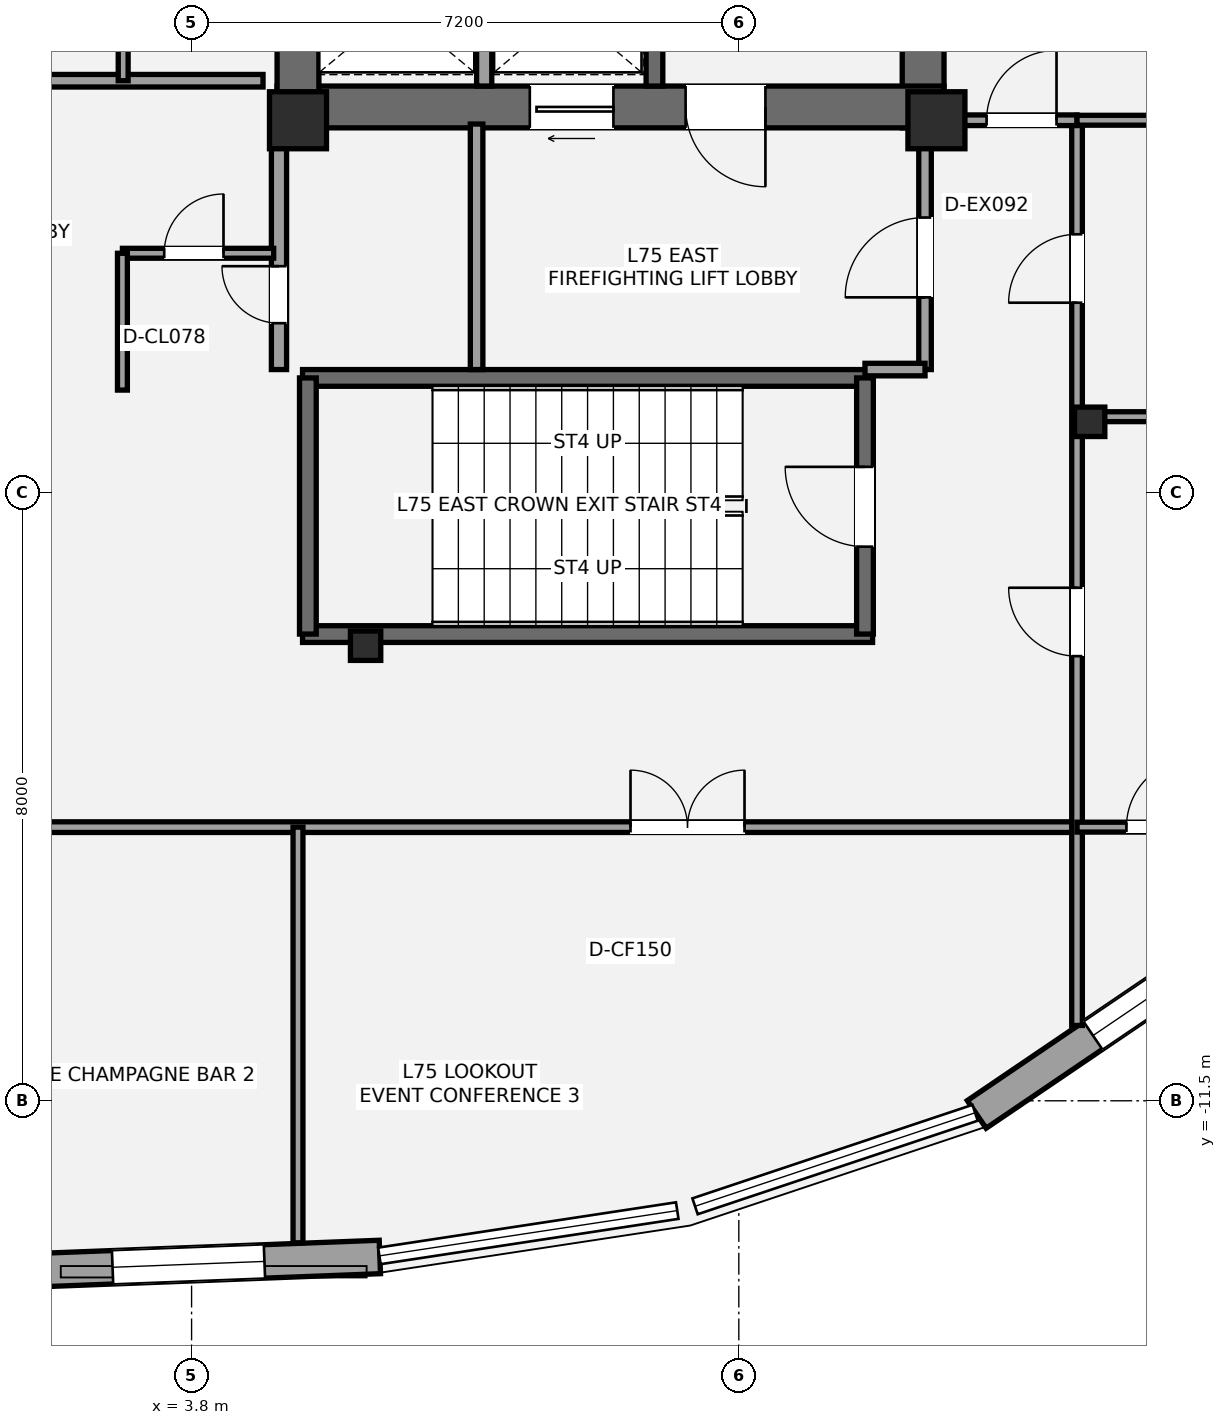
"""IFC4 building model, lengths in metres.
Left out: names, types, materials, properties, quantities, classifications, styles, units other than length and angle.
Written with IfcOpenShell. Run it as: python <this file> out.ifc"""

import sys

from ifc_helpers import new_model, si_unit, direction, frame, frame_2d, origin, origin_2d, place, context, subcontext, project, spatial, rectangle, i_section, extrude, element, fill, save


model = new_model("IFC4")
c1 = context("Model", 3, precision=1e-05, world=origin(), true_north=direction((0.0, 1.0)))
c2 = subcontext(c1, "Body", "Model", "MODEL_VIEW")
j1 = project(units=[si_unit("LENGTHUNIT", "METRE"), si_unit("PLANEANGLEUNIT", "RADIAN")], contexts=[c1])
p1 = place(None, origin())
s1 = spatial("IfcSite", under=j1, at=p1, CompositionType="ELEMENT")
p2 = place(p1, origin())
s2 = spatial("IfcBuilding", under=s1, at=p2, CompositionType="ELEMENT")
p3 = place(p2, frame((0.0, 0.0, 264.8)))
s3 = spatial("IfcBuildingStorey", under=s2, at=p3, CompositionType="ELEMENT", Elevation=264.8)
p4 = place(p3, frame((13.425, 1.3, 0.0), z_axis=(0.0, 0.0, 1.0), x_axis=(0.0, 1.0, 0.0)))
e1 = element("IfcWall", 1, at=p4, inside=s3, PredefinedType="SHEAR", context=c2, shape_type="SweptSolid", body=[
    extrude(rectangle(XDim=8.25, YDim=0.55, at=frame_2d((4.125, 0.0))), origin(), (0.0, 0.0, 1.0), 4.4),
])
p5 = place(p3, frame((13.7, 1.575, 0.0), z_axis=(0.0, 0.0, 1.0), x_axis=(-1.0, 0.0, 0.0)))
e2 = element("IfcWall", 2, at=p5, inside=s3, PredefinedType="SHEAR", context=c2, shape_type="SweptSolid", body=[
    extrude(rectangle(XDim=8.775, YDim=0.55, at=frame_2d((4.387, 0.0))), origin(), (0.0, 0.0, 1.0), 4.4),
])
p6 = place(p5, frame((2.35, 0.0, 0.0)))
e3 = element("IfcOpeningElement", 3, at=p6, cuts=e2, PredefinedType="OPENING", context=c2, shape_type="SweptSolid", body=[
    extrude(rectangle(XDim=1.05, YDim=2.15, at=frame_2d((0.525, 1.075))), frame((0.0, 0.285, 0.0), z_axis=(0.0, -1.0, 0.0), x_axis=(1.0, 0.0, 0.0)), (0.0, 0.0, 1.0), 0.57),
])
p7 = place(p5, frame((4.35, 0.0, 0.0)))
e4 = element("IfcOpeningElement", 4, at=p7, cuts=e2, PredefinedType="OPENING", context=c2, shape_type="SweptSolid", body=[
    extrude(rectangle(XDim=1.1, YDim=2.2, at=frame_2d((0.55, 1.1))), frame((0.0, 0.285, 0.0), z_axis=(0.0, -1.0, 0.0), x_axis=(1.0, 0.0, 0.0)), (0.0, 0.0, 1.0), 0.57),
])
p8 = place(p3, frame((5.2, 1.3, 0.0), z_axis=(0.0, 0.0, 1.0), x_axis=(0.0, 1.0, 0.0)))
e5 = element("IfcWall", 5, at=p8, inside=s3, PredefinedType="SHEAR", context=c2, shape_type="SweptSolid", body=[
    extrude(rectangle(XDim=2.5, YDim=0.55, at=frame_2d((1.25, 0.0))), origin(), (0.0, 0.0, 1.0), 4.4),
])
p9 = place(p3, frame((9.89, 1.85, 0.0), z_axis=(0.0, 0.0, 1.0), x_axis=(0.0, 1.0, 0.0)))
e6 = element("IfcWall", 6, at=p9, inside=s3, PredefinedType="SHEAR", context=c2, shape_type="SweptSolid", body=[
    extrude(rectangle(XDim=7.15, YDim=0.22, at=frame_2d((3.575, 0.0))), origin(), (0.0, 0.0, 1.0), 4.4),
])
for number, where, z_axis, x_axis in (
    (7, (5.26, -1.99, 0.0), (0.0, 0.0, 1.0), (1.0, 0.0, 0.0)),
    (8, (5.26, -5.36, 0.0), (0.0, 0.0, 1.0), (1.0, 0.0, 0.0)),
):
    element("IfcWall", number, at=place(p3, frame(where, z_axis=z_axis, x_axis=x_axis)), inside=s3, PredefinedType="SHEAR", context=c2, shape_type="SweptSolid", body=[
        extrude(rectangle(XDim=7.5, YDim=0.22, at=frame_2d((3.75, 0.0))), origin(), (0.0, 0.0, 1.0), 4.4),
    ])
p10 = place(p3, frame((5.33, -5.36, 0.0), z_axis=(0.0, 0.0, 1.0), x_axis=(0.0, 1.0, 0.0)))
e9 = element("IfcWall", 9, at=p10, inside=s3, PredefinedType="SHEAR", context=c2, shape_type="SweptSolid", body=[
    extrude(rectangle(XDim=3.37, YDim=0.22, at=frame_2d((1.685, 0.0))), origin(), (0.0, 0.0, 1.0), 4.4),
])
p11 = place(p3, frame((12.66, -5.36, 0.0), z_axis=(0.0, 0.0, 1.0), x_axis=(0.0, 1.0, 0.0)))
e10 = element("IfcWall", 10, at=p11, inside=s3, PredefinedType="SHEAR", context=c2, shape_type="SweptSolid", body=[
    extrude(rectangle(XDim=3.37, YDim=0.22, at=frame_2d((1.685, 0.0))), origin(), (0.0, 0.0, 1.0), 4.4),
])
p12 = place(p11, frame((1.15, 0.0, 0.0)))
e11 = element("IfcOpeningElement", 11, at=p12, cuts=e10, PredefinedType="OPENING", context=c2, shape_type="SweptSolid", body=[
    extrude(rectangle(XDim=1.05, YDim=2.15, at=frame_2d((0.525, 1.075))), frame((0.0, 0.12, 0.0), z_axis=(0.0, -1.0, 0.0), x_axis=(1.0, 0.0, 0.0)), (0.0, 0.0, 1.0), 0.24),
])
for number, where, z_axis, x_axis in (
    (12, (5.2, 1.4, 0.0), (0.0, 0.0, 1.0), (1.0, 0.0, 0.0)),
    (13, (13.6, 1.4, 0.0), (0.0, 0.0, 1.0), (1.0, 0.0, 0.0)),
):
    element("IfcColumn", number, at=place(p3, frame(where, z_axis=z_axis, x_axis=x_axis)), inside=s3, PredefinedType="PILASTER", context=c2, shape_type="SweptSolid", body=[
        extrude(rectangle(XDim=0.75, YDim=0.75, at=origin_2d()), origin(), (0.0, 0.0, 1.0), 4.4),
    ])
for number, where, z_axis, x_axis in (
    (14, (6.09, -5.513, 0.0), (0.0, 0.0, 1.0), (1.0, 0.0, 0.0)),
    (15, (15.616, -2.567, 0.0), (0.0, 0.0, 1.0), (1.0, 0.0, 0.0)),
):
    element("IfcColumn", number, at=place(p3, frame(where, z_axis=z_axis, x_axis=x_axis)), inside=s3, PredefinedType="COLUMN", context=c2, shape_type="SweptSolid", body=[
        extrude(i_section(OverallWidth=0.399, OverallDepth=0.387, WebThickness=0.021, FlangeThickness=0.033, at=origin_2d()), origin(), (0.0, 0.0, 1.0), 4.4),
    ])
p13 = place(p3, frame((6.277, -13.555, 0.0), z_axis=(0.0, 0.0, 1.0), x_axis=(-0.999255266714, -0.038586421751, 0.0)))
e16 = element("IfcWall", 16, at=p13, inside=s3, PredefinedType="STANDARD", context=c2, shape_type="SweptSolid", body=[
    extrude(rectangle(XDim=4.404, YDim=0.44, at=frame_2d((2.202, 0.0))), origin(), (0.0, 0.0, 1.0), 3.566),
])
p14 = place(p13, frame((1.52, 0.0, 0.6)))
e17 = element("IfcOpeningElement", 17, at=p14, cuts=e16, PredefinedType="OPENING", context=c2, shape_type="SweptSolid", body=[
    extrude(rectangle(XDim=2.0, YDim=2.1, at=frame_2d((1.0, 1.05))), frame((0.0, 0.23, 0.0), z_axis=(0.0, -1.0, 0.0), x_axis=(1.0, 0.0, 0.0)), (0.0, 0.0, 1.0), 0.46),
])
p15 = place(p3, frame((17.315, -9.52, 0.0), z_axis=(0.0, 0.0, 1.0), x_axis=(-0.827730474906, -0.561125886867, 0.0)))
e18 = element("IfcWall", 18, at=p15, inside=s3, PredefinedType="STANDARD", context=c2, shape_type="SweptSolid", body=[
    extrude(rectangle(XDim=3.848, YDim=0.44, at=frame_2d((1.924, 0.0))), origin(), (0.0, 0.0, 1.0), 3.566),
])
p16 = place(p15, frame((0.6, 0.0, 0.58)))
e19 = element("IfcOpeningElement", 19, at=p16, cuts=e18, PredefinedType="OPENING", context=c2, shape_type="SweptSolid", body=[
    extrude(rectangle(XDim=1.4, YDim=1.55, at=frame_2d((0.7, 0.775))), frame((0.0, 0.23, 0.0), z_axis=(0.0, -1.0, 0.0), x_axis=(1.0, 0.0, 0.0)), (0.0, 0.0, 1.0), 0.46),
])
p17 = place(p3, frame((7.55, -1.88, 0.0), z_axis=(0.0, 0.0, 1.0), x_axis=(0.0, 1.0, 0.0)))
e20 = element("IfcWall", 20, at=p17, inside=s3, PredefinedType="PARTITIONING", context=c2, shape_type="SweptSolid", body=[
    extrude(rectangle(XDim=3.23, YDim=0.165, at=frame_2d((1.615, 0.0))), origin(), (0.0, 0.0, 1.0), 4.2),
])
p18 = place(p3, frame((13.45, -1.88, 0.0), z_axis=(0.0, 0.0, 1.0), x_axis=(0.0, 1.0, 0.0)))
e21 = element("IfcWall", 21, at=p18, inside=s3, PredefinedType="PARTITIONING", context=c2, shape_type="SweptSolid", body=[
    extrude(rectangle(XDim=3.23, YDim=0.165, at=frame_2d((1.615, 0.0))), origin(), (0.0, 0.0, 1.0), 3.661),
])
p19 = place(p18, frame((0.95, 0.0, 0.0)))
e22 = element("IfcOpeningElement", 22, at=p19, cuts=e21, PredefinedType="OPENING", context=c2, shape_type="SweptSolid", body=[
    extrude(rectangle(XDim=1.05, YDim=2.15, at=frame_2d((0.525, 1.075))), frame((0.0, 0.093, 0.0), z_axis=(0.0, -1.0, 0.0), x_axis=(1.0, 0.0, 0.0)), (0.0, 0.0, 1.0), 0.185),
])
p20 = place(p3, frame((12.66, -1.88, 0.0), z_axis=(0.0, 0.0, 1.0), x_axis=(1.0, 0.0, 0.0)))
e23 = element("IfcWall", 23, at=p20, inside=s3, PredefinedType="PARTITIONING", context=c2, shape_type="SweptSolid", body=[
    extrude(rectangle(XDim=0.79, YDim=0.165, at=frame_2d((0.395, 0.0))), origin(), (0.0, 0.0, 1.0), 3.661),
])
p21 = place(p3, frame((4.95, -1.88, 0.0), z_axis=(0.0, 0.0, 1.0), x_axis=(0.0, 1.0, 0.0)))
e24 = element("IfcWall", 24, at=p21, inside=s3, PredefinedType="SOLIDWALL", context=c2, shape_type="SweptSolid", body=[
    extrude(rectangle(XDim=3.23, YDim=0.2, at=frame_2d((1.615, 0.0))), origin(), (0.0, 0.0, 1.0), 3.568),
])
p22 = place(p21, frame((0.61, 0.0, 0.0)))
e25 = element("IfcOpeningElement", 25, at=p22, cuts=e24, PredefinedType="OPENING", context=c2, shape_type="SweptSolid", body=[
    extrude(rectangle(XDim=0.75, YDim=2.1, at=frame_2d((0.375, 1.05))), frame((0.0, 0.11, 0.0), z_axis=(0.0, -1.0, 0.0), x_axis=(1.0, 0.0, 0.0)), (0.0, 0.0, 1.0), 0.22),
])
p23 = place(p3, frame((2.89, -0.35, 0.0), z_axis=(0.0, 0.0, 1.0), x_axis=(1.0, 0.0, 0.0)))
e26 = element("IfcWall", 26, at=p23, inside=s3, PredefinedType="PARTITIONING", context=c2, shape_type="SweptSolid", body=[
    extrude(rectangle(XDim=1.99, YDim=0.13, at=frame_2d((0.995, 0.0))), origin(), (0.0, 0.0, 1.0), 4.2),
])
p24 = place(p23, frame((0.55, 0.0, 0.0)))
e27 = element("IfcOpeningElement", 27, at=p24, cuts=e26, PredefinedType="OPENING", context=c2, shape_type="SweptSolid", body=[
    extrude(rectangle(XDim=0.78, YDim=2.1, at=frame_2d((0.39, 1.05))), frame((0.0, 0.075, 0.0), z_axis=(0.0, -1.0, 0.0), x_axis=(1.0, 0.0, 0.0)), (0.0, 0.0, 1.0), 0.15),
])
p25 = place(p3, frame((2.89, -2.15, 0.0), z_axis=(0.0, 0.0, 1.0), x_axis=(0.0, 1.0, 0.0)))
e28 = element("IfcWall", 28, at=p25, inside=s3, PredefinedType="PARTITIONING", context=c2, shape_type="SweptSolid", body=[
    extrude(rectangle(XDim=1.8, YDim=0.13, at=frame_2d((0.9, 0.0))), origin(), (0.0, 0.0, 1.0), 4.2),
])
p26 = place(p3, frame((7.65, 1.85, 0.0), z_axis=(0.0, 0.0, 1.0), x_axis=(0.0, 1.0, 0.0)))
e29 = element("IfcWall", 29, at=p26, inside=s3, PredefinedType="SOLIDWALL", context=c2, shape_type="SweptSolid", body=[
    extrude(rectangle(XDim=1.97, YDim=0.2, at=frame_2d((0.985, 0.0))), origin(), (0.0, 0.0, 1.0), 4.2),
])
p27 = place(p3, frame((0.85, 1.92, 0.0), z_axis=(0.0, 0.0, 1.0), x_axis=(1.0, 0.0, 0.0)))
e30 = element("IfcWall", 30, at=p27, inside=s3, PredefinedType="PARTITIONING", context=c2, shape_type="SweptSolid", body=[
    extrude(rectangle(XDim=3.89, YDim=0.165, at=frame_2d((1.945, 0.0))), origin(), (0.0, 0.0, 1.0), 3.34),
])
p28 = place(p3, frame((2.9, 1.92, 0.0), z_axis=(0.0, 0.0, 1.0), x_axis=(0.0, 1.0, 0.0)))
e31 = element("IfcWall", 31, at=p28, inside=s3, PredefinedType="PARTITIONING", context=c2, shape_type="SweptSolid", body=[
    extrude(rectangle(XDim=1.82, YDim=0.13, at=frame_2d((0.91, 0.0))), origin(), (0.0, 0.0, 1.0), 4.2),
])
p29 = place(p3, frame((-15.45, -7.9, 0.0), z_axis=(0.0, 0.0, 1.0), x_axis=(1.0, 0.0, 0.0)))
e32 = element("IfcWall", 32, at=p29, inside=s3, PredefinedType="PARTITIONING", context=c2, shape_type="SweptSolid", body=[
    extrude(rectangle(XDim=30.9, YDim=0.14, at=frame_2d((15.45, 0.0))), origin(), (0.0, 0.0, 1.0), 3.661),
])
p30 = place(p29, frame((5.275, 0.0, 0.0)))
e33 = element("IfcOpeningElement", 33, at=p30, cuts=e32, PredefinedType="OPENING", context=c2, shape_type="SweptSolid", body=[
    extrude(rectangle(XDim=0.9, YDim=2.1, at=frame_2d((0.45, 1.05))), frame((0.0, 0.08, 0.0), z_axis=(0.0, -1.0, 0.0), x_axis=(1.0, 0.0, 0.0)), (0.0, 0.0, 1.0), 0.16),
])
p31 = place(p29, frame((15.6, 0.0, 0.0)))
e34 = element("IfcOpeningElement", 34, at=p31, cuts=e32, PredefinedType="OPENING", context=c2, shape_type="SweptSolid", body=[
    extrude(rectangle(XDim=0.9, YDim=2.1, at=frame_2d((0.45, 1.05))), frame((0.0, 0.08, 0.0), z_axis=(0.0, -1.0, 0.0), x_axis=(1.0, 0.0, 0.0)), (0.0, 0.0, 1.0), 0.16),
])
p32 = place(p29, frame((25.025, 0.0, 0.0)))
e35 = element("IfcOpeningElement", 35, at=p32, cuts=e32, PredefinedType="OPENING", context=c2, shape_type="SweptSolid", body=[
    extrude(rectangle(XDim=1.5, YDim=2.15, at=frame_2d((0.75, 1.075))), frame((0.0, 0.08, 0.0), z_axis=(0.0, -1.0, 0.0), x_axis=(1.0, 0.0, 0.0)), (0.0, 0.0, 1.0), 0.16),
])
p33 = place(p3, frame((15.45, -10.509, 0.0), z_axis=(0.0, 0.0, 1.0), x_axis=(0.0, 1.0, 0.0)))
e36 = element("IfcWall", 36, at=p33, inside=s3, PredefinedType="PARTITIONING", context=c2, shape_type="SweptSolid", body=[
    extrude(rectangle(XDim=11.909, YDim=0.14, at=frame_2d((5.955, 0.0))), origin(), (0.0, 0.0, 1.0), 3.661),
])
p34 = place(p33, frame((4.859, 0.0, 0.0)))
e37 = element("IfcOpeningElement", 37, at=p34, cuts=e36, PredefinedType="OPENING", context=c2, shape_type="SweptSolid", body=[
    extrude(rectangle(XDim=0.9, YDim=2.1, at=frame_2d((0.45, 1.05))), frame((0.0, 0.08, 0.0), z_axis=(0.0, -1.0, 0.0), x_axis=(1.0, 0.0, 0.0)), (0.0, 0.0, 1.0), 0.16),
])
p35 = place(p33, frame((9.509, 0.0, 0.0)))
e38 = element("IfcOpeningElement", 38, at=p35, cuts=e36, PredefinedType="OPENING", context=c2, shape_type="SweptSolid", body=[
    extrude(rectangle(XDim=0.9, YDim=2.1, at=frame_2d((0.45, 1.05))), frame((0.0, 0.08, 0.0), z_axis=(0.0, -1.0, 0.0), x_axis=(1.0, 0.0, 0.0)), (0.0, 0.0, 1.0), 0.16),
])
p36 = place(p3, frame((13.7, 1.4, 0.0), z_axis=(0.0, 0.0, 1.0), x_axis=(1.0, 0.0, 0.0)))
e39 = element("IfcWall", 39, at=p36, inside=s3, PredefinedType="PARTITIONING", context=c2, shape_type="SweptSolid", body=[
    extrude(rectangle(XDim=1.75, YDim=0.14, at=frame_2d((0.875, 0.0))), origin(), (0.0, 0.0, 1.0), 3.661),
])
p37 = place(p36, frame((0.56, 0.0, 0.0)))
e40 = element("IfcOpeningElement", 40, at=p37, cuts=e39, PredefinedType="OPENING", context=c2, shape_type="SweptSolid", body=[
    extrude(rectangle(XDim=0.92, YDim=2.15, at=frame_2d((0.46, 1.075))), frame((0.0, 0.08, 0.0), z_axis=(0.0, -1.0, 0.0), x_axis=(1.0, 0.0, 0.0)), (0.0, 0.0, 1.0), 0.16),
])
p38 = place(p3, frame((5.2, -13.368, 0.0), z_axis=(0.0, 0.0, 1.0), x_axis=(0.0, 1.0, 0.0)))
e41 = element("IfcWall", 41, at=p38, inside=s3, PredefinedType="PARTITIONING", context=c2, shape_type="SweptSolid", body=[
    extrude(rectangle(XDim=5.468, YDim=0.13, at=frame_2d((2.734, 0.0))), origin(), (0.0, 0.0, 1.0), 4.2),
])
p39 = place(p3, frame((15.45, 1.4, 0.0), z_axis=(0.0, 0.0, 1.0), x_axis=(1.0, 0.0, 0.0)))
e42 = element("IfcWall", 42, at=p39, inside=s3, PredefinedType="PARTITIONING", context=c2, shape_type="SweptSolid", body=[
    extrude(rectangle(XDim=4.659, YDim=0.13, at=frame_2d((2.33, 0.0))), origin(), (0.0, 0.0, 1.0), 3.661),
])
p40 = place(p3, frame((15.45, -7.9, 0.0), z_axis=(0.0, 0.0, 1.0), x_axis=(1.0, 0.0, 0.0)))
e43 = element("IfcWall", 43, at=p40, inside=s3, PredefinedType="PARTITIONING", context=c2, shape_type="SweptSolid", body=[
    extrude(rectangle(XDim=2.744, YDim=0.13, at=frame_2d((1.372, 0.0))), origin(), (0.0, 0.0, 1.0), 3.661),
])
p41 = place(p40, frame((0.65, 0.0, 0.0)))
e44 = element("IfcOpeningElement", 44, at=p41, cuts=e43, PredefinedType="OPENING", context=c2, shape_type="SweptSolid", body=[
    extrude(rectangle(XDim=0.9, YDim=2.1, at=frame_2d((0.45, 1.05))), frame((0.0, 0.075, 0.0), z_axis=(0.0, -1.0, 0.0), x_axis=(1.0, 0.0, 0.0)), (0.0, 0.0, 1.0), 0.15),
])
p42 = place(p3, frame((15.45, -2.5, 0.0), z_axis=(0.0, 0.0, 1.0), x_axis=(1.0, 0.0, 0.0)))
e45 = element("IfcWall", 45, at=p42, inside=s3, PredefinedType="PARTITIONING", context=c2, shape_type="SweptSolid", body=[
    extrude(rectangle(XDim=4.567, YDim=0.13, at=frame_2d((2.284, 0.0))), origin(), (0.0, 0.0, 1.0), 4.2),
])
p43 = place(p14, origin())
e46 = element("IfcWindow", 46, at=p43, inside=s3, PartitioningType="SINGLE_PANEL", PredefinedType="WINDOW", context=c2, shape_type="SweptSolid", body=[
    extrude(rectangle(XDim=2.0, YDim=2.1, at=frame_2d((1.0, 1.05))), frame((0.0, -0.01, 0.0), z_axis=(0.0, -1.0, 0.0), x_axis=(1.0, 0.0, 0.0)), (0.0, 0.0, 1.0), 0.06),
])
fill(e17, e46)
p44 = place(p16, origin())
e47 = element("IfcWindow", 47, at=p44, inside=s3, PartitioningType="SINGLE_PANEL", PredefinedType="WINDOW", context=c2, shape_type="SweptSolid", body=[
    extrude(rectangle(XDim=1.4, YDim=1.55, at=frame_2d((0.7, 0.775))), frame((0.0, -0.01, 0.0), z_axis=(0.0, -1.0, 0.0), x_axis=(1.0, 0.0, 0.0)), (0.0, 0.0, 1.0), 0.06),
])
fill(e19, e47)
p45 = place(p6, origin())
e48 = element("IfcDoor", 48, at=p45, inside=s3, OperationType="SINGLE_SWING_LEFT", PredefinedType="DOOR", context=c2, shape_type="SweptSolid", body=[
    extrude(rectangle(XDim=1.05, YDim=2.15, at=frame_2d((0.525, 1.075))), frame((0.0, 0.025, 0.0), z_axis=(0.0, -1.0, 0.0), x_axis=(1.0, 0.0, 0.0)), (0.0, 0.0, 1.0), 0.05),
])
fill(e3, e48)
p46 = place(p12, origin())
e49 = element("IfcDoor", 49, at=p46, inside=s3, OperationType="SINGLE_SWING_RIGHT", PredefinedType="DOOR", context=c2, shape_type="SweptSolid", body=[
    extrude(rectangle(XDim=1.05, YDim=2.15, at=frame_2d((0.525, 1.075))), frame((0.0, 0.025, 0.0), z_axis=(0.0, -1.0, 0.0), x_axis=(1.0, 0.0, 0.0)), (0.0, 0.0, 1.0), 0.05),
])
fill(e11, e49)
p47 = place(p19, origin())
e50 = element("IfcDoor", 50, at=p47, inside=s3, OperationType="SINGLE_SWING_LEFT", PredefinedType="DOOR", context=c2, shape_type="SweptSolid", body=[
    extrude(rectangle(XDim=1.05, YDim=2.15, at=frame_2d((0.525, 1.075))), frame((0.0, 0.025, 0.0), z_axis=(0.0, -1.0, 0.0), x_axis=(1.0, 0.0, 0.0)), (0.0, 0.0, 1.0), 0.05),
])
fill(e22, e50)
p48 = place(p22, origin())
e51 = element("IfcDoor", 51, at=p48, inside=s3, OperationType="SINGLE_SWING_RIGHT", PredefinedType="DOOR", context=c2, shape_type="SweptSolid", body=[
    extrude(rectangle(XDim=0.75, YDim=2.1, at=frame_2d((0.375, 1.05))), frame((0.0, 0.025, 0.0), z_axis=(0.0, -1.0, 0.0), x_axis=(1.0, 0.0, 0.0)), (0.0, 0.0, 1.0), 0.05),
])
fill(e25, e51)
p49 = place(p24, origin())
e52 = element("IfcDoor", 52, at=p49, inside=s3, OperationType="SINGLE_SWING_RIGHT", PredefinedType="DOOR", context=c2, shape_type="SweptSolid", body=[
    extrude(rectangle(XDim=0.78, YDim=2.1, at=frame_2d((0.39, 1.05))), frame((0.0, 0.025, 0.0), z_axis=(0.0, -1.0, 0.0), x_axis=(1.0, 0.0, 0.0)), (0.0, 0.0, 1.0), 0.05),
])
fill(e27, e52)
p50 = place(p7, origin())
e53 = element("IfcDoor", 53, at=p50, inside=s3, OperationType="SLIDING_TO_LEFT", PredefinedType="DOOR", context=c2, shape_type="SweptSolid", body=[
    extrude(rectangle(XDim=1.1, YDim=2.2, at=frame_2d((0.55, 1.1))), frame((0.0, 0.025, 0.0), z_axis=(0.0, -1.0, 0.0), x_axis=(1.0, 0.0, 0.0)), (0.0, 0.0, 1.0), 0.05),
])
fill(e4, e53)
p51 = place(p32, origin())
e54 = element("IfcDoor", 54, at=p51, inside=s3, OperationType="DOUBLE_DOOR_SINGLE_SWING", PredefinedType="DOOR", context=c2, shape_type="SweptSolid", body=[
    extrude(rectangle(XDim=1.5, YDim=2.15, at=frame_2d((0.75, 1.075))), frame((0.0, 0.025, 0.0), z_axis=(0.0, -1.0, 0.0), x_axis=(1.0, 0.0, 0.0)), (0.0, 0.0, 1.0), 0.05),
])
fill(e35, e54)
p52 = place(p37, origin())
e55 = element("IfcDoor", 55, at=p52, inside=s3, OperationType="SINGLE_SWING_RIGHT", PredefinedType="DOOR", context=c2, shape_type="SweptSolid", body=[
    extrude(rectangle(XDim=0.92, YDim=2.15, at=frame_2d((0.46, 1.075))), frame((0.0, 0.025, 0.0), z_axis=(0.0, -1.0, 0.0), x_axis=(1.0, 0.0, 0.0)), (0.0, 0.0, 1.0), 0.05),
])
fill(e40, e55)
p53 = place(p41, origin())
e56 = element("IfcDoor", 56, at=p53, inside=s3, OperationType="SINGLE_SWING_RIGHT", PredefinedType="DOOR", context=c2, shape_type="SweptSolid", body=[
    extrude(rectangle(XDim=0.9, YDim=2.1, at=frame_2d((0.45, 1.05))), frame((0.0, 0.025, 0.0), z_axis=(0.0, -1.0, 0.0), x_axis=(1.0, 0.0, 0.0)), (0.0, 0.0, 1.0), 0.05),
])
fill(e44, e56)
p54 = place(p34, origin())
e57 = element("IfcDoor", 57, at=p54, inside=s3, OperationType="SINGLE_SWING_RIGHT", PredefinedType="DOOR", context=c2, shape_type="SweptSolid", body=[
    extrude(rectangle(XDim=0.9, YDim=2.1, at=frame_2d((0.45, 1.05))), frame((0.0, 0.025, 0.0), z_axis=(0.0, -1.0, 0.0), x_axis=(1.0, 0.0, 0.0)), (0.0, 0.0, 1.0), 0.05),
])
fill(e37, e57)
p55 = place(p35, origin())
e58 = element("IfcDoor", 58, at=p55, inside=s3, OperationType="SINGLE_SWING_LEFT", PredefinedType="DOOR", context=c2, shape_type="SweptSolid", body=[
    extrude(rectangle(XDim=0.9, YDim=2.1, at=frame_2d((0.45, 1.05))), frame((0.0, 0.025, 0.0), z_axis=(0.0, -1.0, 0.0), x_axis=(1.0, 0.0, 0.0)), (0.0, 0.0, 1.0), 0.05),
])
fill(e38, e58)
save(model, sys.argv[1])
